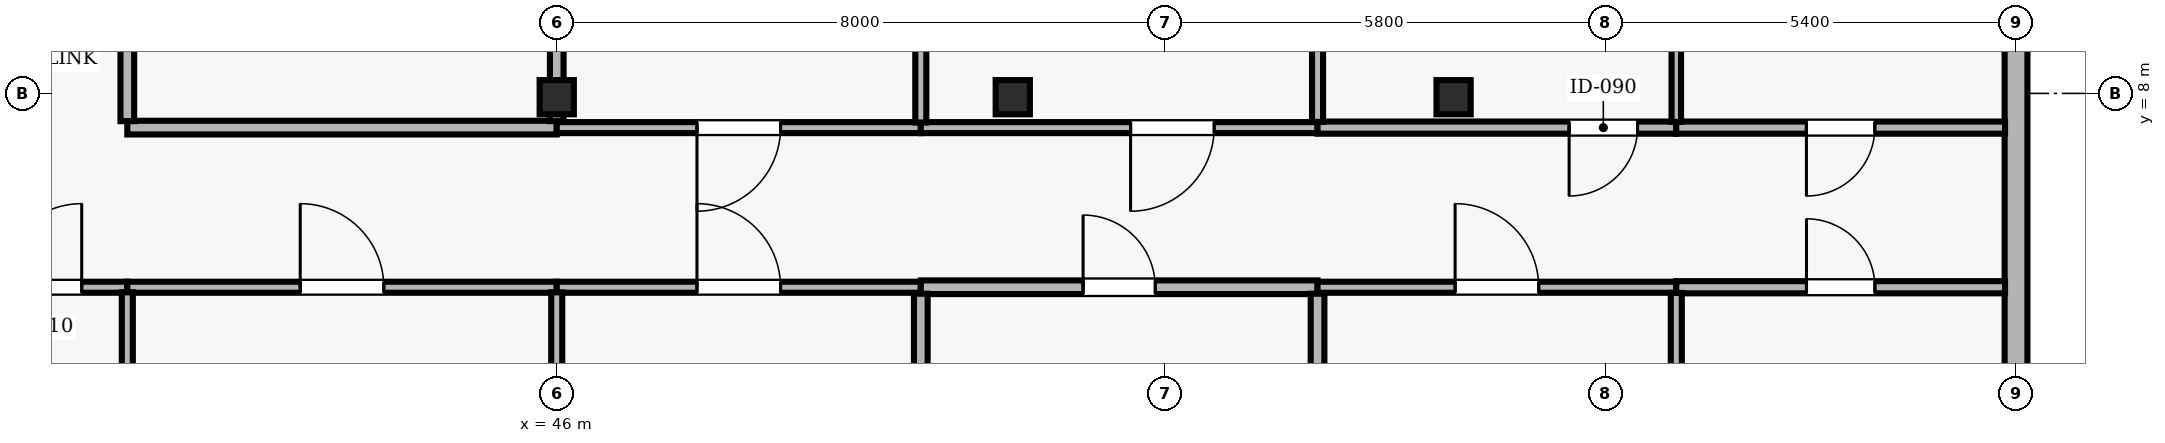
"""IFC4 building model, lengths in metres.
Left out: names, types, materials, properties, quantities, classifications, styles, units other than length and angle.
Written with IfcOpenShell. Run it as: python <this file> out.ifc"""

import sys

from ifc_helpers import new_model, si_unit, direction, frame, frame_2d, origin, origin_2d, place, context, subcontext, project, spatial, rectangle, hollow_rectangle, extrude, element, fill, save


model = new_model("IFC4")
c1 = context("Model", 3, precision=1e-05, world=origin(), true_north=direction((0.0, 1.0)))
c2 = subcontext(c1, "Body", "Model", "MODEL_VIEW")
j1 = project(units=[si_unit("LENGTHUNIT", "METRE"), si_unit("PLANEANGLEUNIT", "RADIAN")], contexts=[c1])
p1 = place(None, origin())
s1 = spatial("IfcSite", under=j1, at=p1, CompositionType="ELEMENT")
p2 = place(p1, origin())
s2 = spatial("IfcBuilding", under=s1, at=p2, CompositionType="ELEMENT")
p3 = place(p2, frame((0.0, 0.0, 207.0)))
s3 = spatial("IfcBuildingStorey", under=s2, at=p3, CompositionType="ELEMENT", Elevation=207.0)
for number, where, z_axis, x_axis in (
    (1, (46.0, 7.95, 0.0), (0.0, 0.0, 1.0), (1.0, 0.0, 0.0)),
    (2, (52.0, 7.95, 0.0), (0.0, 0.0, 1.0), (1.0, 0.0, 0.0)),
    (3, (57.8, 7.95, 0.0), (0.0, 0.0, 1.0), (1.0, 0.0, 0.0)),
):
    element("IfcColumn", number, at=place(p3, frame(where, z_axis=z_axis, x_axis=x_axis)), inside=s3, PredefinedType="COLUMN", context=c2, shape_type="SweptSolid", body=[
        extrude(hollow_rectangle(XDim=0.45, YDim=0.45, WallThickness=0.02, at=origin_2d()), origin(), (0.0, 0.0, 1.0), 3.9),
    ])
p4 = place(p3, frame((65.2, 2.5, 0.0), z_axis=(0.0, 0.0, 1.0), x_axis=(0.0, 1.0, 0.0)))
e4 = element("IfcWall", 4, at=p4, inside=s3, PredefinedType="SOLIDWALL", context=c2, shape_type="SweptSolid", body=[
    extrude(rectangle(XDim=11.0, YDim=0.3, at=frame_2d((5.5, 0.0))), origin(), (0.0, 0.0, 1.0), 3.69),
])
p5 = place(p4, frame((7.05, 0.0, 0.9)))
e5 = element("IfcOpeningElement", 5, at=p5, cuts=e4, PredefinedType="OPENING", context=c2, shape_type="SweptSolid", body=[
    extrude(rectangle(XDim=2.4, YDim=1.6, at=frame_2d((1.2, 0.8))), frame((0.0, 0.16, 0.0), z_axis=(0.0, -1.0, 0.0), x_axis=(1.0, 0.0, 0.0)), (0.0, 0.0, 1.0), 0.32),
])
p6 = place(p3, frame((38.05, 5.45, 0.0), z_axis=(0.0, 0.0, 1.0), x_axis=(1.0, 0.0, 0.0)))
e6 = element("IfcWall", 6, at=p6, inside=s3, PredefinedType="PARTITIONING", context=c2, shape_type="SweptSolid", body=[
    extrude(rectangle(XDim=2.3, YDim=0.145, at=frame_2d((1.15, 0.0))), origin(), (0.0, 0.0, 1.0), 3.343),
])
p7 = place(p6, frame((0.6, 0.0, 0.0)))
e7 = element("IfcOpeningElement", 7, at=p7, cuts=e6, PredefinedType="OPENING", context=c2, shape_type="SweptSolid", body=[
    extrude(rectangle(XDim=1.1, YDim=2.15, at=frame_2d((0.55, 1.075))), frame((0.0, 0.083, 0.0), z_axis=(0.0, -1.0, 0.0), x_axis=(1.0, 0.0, 0.0)), (0.0, 0.0, 1.0), 0.165),
])
p8 = place(p3, frame((40.35, 5.45, 0.0), z_axis=(0.0, 0.0, 1.0), x_axis=(1.0, 0.0, 0.0)))
e8 = element("IfcWall", 8, at=p8, inside=s3, PredefinedType="PARTITIONING", context=c2, shape_type="SweptSolid", body=[
    extrude(rectangle(XDim=5.65, YDim=0.145, at=frame_2d((2.825, 0.0))), origin(), (0.0, 0.0, 1.0), 3.343),
])
p9 = place(p8, frame((2.275, 0.0, 0.0)))
e9 = element("IfcOpeningElement", 9, at=p9, cuts=e8, PredefinedType="OPENING", context=c2, shape_type="SweptSolid", body=[
    extrude(rectangle(XDim=1.1, YDim=2.15, at=frame_2d((0.55, 1.075))), frame((0.0, 0.083, 0.0), z_axis=(0.0, -1.0, 0.0), x_axis=(1.0, 0.0, 0.0)), (0.0, 0.0, 1.0), 0.165),
])
p10 = place(p3, frame((46.0, 5.45, 0.0), z_axis=(0.0, 0.0, 1.0), x_axis=(1.0, 0.0, 0.0)))
e10 = element("IfcWall", 10, at=p10, inside=s3, PredefinedType="PARTITIONING", context=c2, shape_type="SweptSolid", body=[
    extrude(rectangle(XDim=4.79, YDim=0.145, at=frame_2d((2.395, 0.0))), origin(), (0.0, 0.0, 1.0), 3.343),
])
p11 = place(p10, frame((1.845, 0.0, 0.0)))
e11 = element("IfcOpeningElement", 11, at=p11, cuts=e10, PredefinedType="OPENING", context=c2, shape_type="SweptSolid", body=[
    extrude(rectangle(XDim=1.1, YDim=2.15, at=frame_2d((0.55, 1.075))), frame((0.0, 0.083, 0.0), z_axis=(0.0, -1.0, 0.0), x_axis=(1.0, 0.0, 0.0)), (0.0, 0.0, 1.0), 0.165),
])
p12 = place(p3, frame((46.0, 7.55, 0.0), z_axis=(0.0, 0.0, 1.0), x_axis=(-1.0, 0.0, 0.0)))
e12 = element("IfcWall", 12, at=p12, inside=s3, PredefinedType="PARTITIONING", context=c2, shape_type="SweptSolid", body=[
    extrude(rectangle(XDim=5.65, YDim=0.18, at=frame_2d((2.825, 0.0))), origin(), (0.0, 0.0, 1.0), 3.139),
])
p13 = place(p3, frame((50.79, 5.45, 0.0), z_axis=(0.0, 0.0, 1.0), x_axis=(1.0, 0.0, 0.0)))
e13 = element("IfcWall", 13, at=p13, inside=s3, PredefinedType="PARTITIONING", context=c2, shape_type="SweptSolid", body=[
    extrude(rectangle(XDim=5.22, YDim=0.18, at=frame_2d((2.61, 0.0))), origin(), (0.0, 0.0, 1.0), 3.343),
])
p14 = place(p13, frame((2.135, 0.0, 0.0)))
e14 = element("IfcOpeningElement", 14, at=p14, cuts=e13, PredefinedType="OPENING", context=c2, shape_type="SweptSolid", body=[
    extrude(rectangle(XDim=0.95, YDim=2.1, at=frame_2d((0.475, 1.05))), frame((0.0, 0.1, 0.0), z_axis=(0.0, -1.0, 0.0), x_axis=(1.0, 0.0, 0.0)), (0.0, 0.0, 1.0), 0.2),
])
p15 = place(p3, frame((50.79, 7.55, 0.0), z_axis=(0.0, 0.0, 1.0), x_axis=(-1.0, 0.0, 0.0)))
e15 = element("IfcWall", 15, at=p15, inside=s3, PredefinedType="PARTITIONING", context=c2, shape_type="SweptSolid", body=[
    extrude(rectangle(XDim=4.79, YDim=0.145, at=frame_2d((2.395, 0.0))), origin(), (0.0, 0.0, 1.0), 3.139),
])
p16 = place(p15, frame((1.845, 0.0, 0.0)))
e16 = element("IfcOpeningElement", 16, at=p16, cuts=e15, PredefinedType="OPENING", context=c2, shape_type="SweptSolid", body=[
    extrude(rectangle(XDim=1.1, YDim=2.15, at=frame_2d((0.55, 1.075))), frame((0.0, 0.083, 0.0), z_axis=(0.0, -1.0, 0.0), x_axis=(1.0, 0.0, 0.0)), (0.0, 0.0, 1.0), 0.165),
])
p17 = place(p3, frame((56.01, 5.45, 0.0), z_axis=(0.0, 0.0, 1.0), x_axis=(1.0, 0.0, 0.0)))
e17 = element("IfcWall", 17, at=p17, inside=s3, PredefinedType="PARTITIONING", context=c2, shape_type="SweptSolid", body=[
    extrude(rectangle(XDim=4.72, YDim=0.145, at=frame_2d((2.36, 0.0))), origin(), (0.0, 0.0, 1.0), 3.343),
])
p18 = place(p17, frame((1.81, 0.0, 0.0)))
e18 = element("IfcOpeningElement", 18, at=p18, cuts=e17, PredefinedType="OPENING", context=c2, shape_type="SweptSolid", body=[
    extrude(rectangle(XDim=1.1, YDim=2.15, at=frame_2d((0.55, 1.075))), frame((0.0, 0.083, 0.0), z_axis=(0.0, -1.0, 0.0), x_axis=(1.0, 0.0, 0.0)), (0.0, 0.0, 1.0), 0.165),
])
p19 = place(p3, frame((56.01, 7.55, 0.0), z_axis=(0.0, 0.0, 1.0), x_axis=(-1.0, 0.0, 0.0)))
e19 = element("IfcWall", 19, at=p19, inside=s3, PredefinedType="PARTITIONING", context=c2, shape_type="SweptSolid", body=[
    extrude(rectangle(XDim=5.22, YDim=0.145, at=frame_2d((2.61, 0.0))), origin(), (0.0, 0.0, 1.0), 3.139),
])
p20 = place(p19, frame((1.36, 0.0, 0.0)))
e20 = element("IfcOpeningElement", 20, at=p20, cuts=e19, PredefinedType="OPENING", context=c2, shape_type="SweptSolid", body=[
    extrude(rectangle(XDim=1.1, YDim=2.15, at=frame_2d((0.55, 1.075))), frame((0.0, 0.083, 0.0), z_axis=(0.0, -1.0, 0.0), x_axis=(1.0, 0.0, 0.0)), (0.0, 0.0, 1.0), 0.165),
])
p21 = place(p3, frame((60.73, 5.45, 0.0), z_axis=(0.0, 0.0, 1.0), x_axis=(1.0, 0.0, 0.0)))
e21 = element("IfcWall", 21, at=p21, inside=s3, PredefinedType="PARTITIONING", context=c2, shape_type="SweptSolid", body=[
    extrude(rectangle(XDim=4.325, YDim=0.16, at=frame_2d((2.163, 0.0))), origin(), (0.0, 0.0, 1.0), 3.69),
])
p22 = place(p21, frame((1.713, 0.0, 0.0)))
e22 = element("IfcOpeningElement", 22, at=p22, cuts=e21, PredefinedType="OPENING", context=c2, shape_type="SweptSolid", body=[
    extrude(rectangle(XDim=0.9, YDim=2.1, at=frame_2d((0.45, 1.05))), frame((0.0, 0.09, 0.0), z_axis=(0.0, -1.0, 0.0), x_axis=(1.0, 0.0, 0.0)), (0.0, 0.0, 1.0), 0.18),
])
p23 = place(p3, frame((60.73, 7.55, 0.0), z_axis=(0.0, 0.0, 1.0), x_axis=(-1.0, 0.0, 0.0)))
e23 = element("IfcWall", 23, at=p23, inside=s3, PredefinedType="PARTITIONING", context=c2, shape_type="SweptSolid", body=[
    extrude(rectangle(XDim=4.72, YDim=0.16, at=frame_2d((2.36, 0.0))), origin(), (0.0, 0.0, 1.0), 3.139),
])
p24 = place(p23, frame((0.51, 0.0, 0.0)))
e24 = element("IfcOpeningElement", 24, at=p24, cuts=e23, PredefinedType="OPENING", context=c2, shape_type="SweptSolid", body=[
    extrude(rectangle(XDim=0.9, YDim=2.1, at=frame_2d((0.45, 1.05))), frame((0.0, 0.09, 0.0), z_axis=(0.0, -1.0, 0.0), x_axis=(1.0, 0.0, 0.0)), (0.0, 0.0, 1.0), 0.18),
])
p25 = place(p3, frame((65.055, 7.55, 0.0), z_axis=(0.0, 0.0, 1.0), x_axis=(-1.0, 0.0, 0.0)))
e25 = element("IfcWall", 25, at=p25, inside=s3, PredefinedType="PARTITIONING", context=c2, shape_type="SweptSolid", body=[
    extrude(rectangle(XDim=4.325, YDim=0.16, at=frame_2d((2.163, 0.0))), origin(), (0.0, 0.0, 1.0), 3.69),
])
p26 = place(p25, frame((1.713, 0.0, 0.0)))
e26 = element("IfcOpeningElement", 26, at=p26, cuts=e25, PredefinedType="OPENING", context=c2, shape_type="SweptSolid", body=[
    extrude(rectangle(XDim=0.9, YDim=2.1, at=frame_2d((0.45, 1.05))), frame((0.0, 0.09, 0.0), z_axis=(0.0, -1.0, 0.0), x_axis=(1.0, 0.0, 0.0)), (0.0, 0.0, 1.0), 0.18),
])
p27 = place(p3, frame((40.35, 0.09, 0.0), z_axis=(0.0, 0.0, 1.0), x_axis=(0.0, 1.0, 0.0)))
e27 = element("IfcWall", 27, at=p27, inside=s3, PredefinedType="PARTITIONING", context=c2, shape_type="SweptSolid", body=[
    extrude(rectangle(XDim=5.293, YDim=0.145, at=frame_2d((2.646, 0.0))), origin(), (0.0, 0.0, 1.0), 3.69),
])
p28 = place(p3, frame((40.35, 7.635, 0.0), z_axis=(0.0, 0.0, 1.0), x_axis=(0.0, 1.0, 0.0)))
e28 = element("IfcWall", 28, at=p28, inside=s3, PredefinedType="PARTITIONING", context=c2, shape_type="SweptSolid", body=[
    extrude(rectangle(XDim=8.28, YDim=0.18, at=frame_2d((4.14, 0.0))), origin(), (0.0, 0.0, 1.0), 3.343),
])
p29 = place(p28, frame((3.665, 0.0, 0.0)))
e29 = element("IfcOpeningElement", 29, at=p29, cuts=e28, PredefinedType="OPENING", context=c2, shape_type="SweptSolid", body=[
    extrude(rectangle(XDim=0.95, YDim=2.1, at=frame_2d((0.475, 1.05))), frame((0.0, 0.1, 0.0), z_axis=(0.0, -1.0, 0.0), x_axis=(1.0, 0.0, 0.0)), (0.0, 0.0, 1.0), 0.2),
])
p30 = place(p3, frame((46.0, 0.145, 0.0), z_axis=(0.0, 0.0, 1.0), x_axis=(0.0, 1.0, 0.0)))
e30 = element("IfcWall", 30, at=p30, inside=s3, PredefinedType="PARTITIONING", context=c2, shape_type="SweptSolid", body=[
    extrude(rectangle(XDim=5.238, YDim=0.145, at=frame_2d((2.619, 0.0))), origin(), (0.0, 0.0, 1.0), 3.139),
])
p31 = place(p3, frame((46.0, 7.635, 0.0), z_axis=(0.0, 0.0, 1.0), x_axis=(0.0, 1.0, 0.0)))
e31 = element("IfcWall", 31, at=p31, inside=s3, PredefinedType="PARTITIONING", context=c2, shape_type="SweptSolid", body=[
    extrude(rectangle(XDim=8.22, YDim=0.18, at=frame_2d((4.11, 0.0))), origin(), (0.0, 0.0, 1.0), 3.139),
])
p32 = place(p3, frame((50.79, 0.09, 0.0), z_axis=(0.0, 0.0, 1.0), x_axis=(0.0, 1.0, 0.0)))
e32 = element("IfcWall", 32, at=p32, inside=s3, PredefinedType="PARTITIONING", context=c2, shape_type="SweptSolid", body=[
    extrude(rectangle(XDim=5.275, YDim=0.18, at=frame_2d((2.637, 0.0))), origin(), (0.0, 0.0, 1.0), 3.69),
])
p33 = place(p3, frame((50.79, 7.617, 0.0), z_axis=(0.0, 0.0, 1.0), x_axis=(0.0, 1.0, 0.0)))
e33 = element("IfcWall", 33, at=p33, inside=s3, PredefinedType="PARTITIONING", context=c2, shape_type="SweptSolid", body=[
    extrude(rectangle(XDim=8.238, YDim=0.145, at=frame_2d((4.119, 0.0))), origin(), (0.0, 0.0, 1.0), 3.69),
])
p34 = place(p3, frame((56.01, 0.09, 0.0), z_axis=(0.0, 0.0, 1.0), x_axis=(0.0, 1.0, 0.0)))
e34 = element("IfcWall", 34, at=p34, inside=s3, PredefinedType="PARTITIONING", context=c2, shape_type="SweptSolid", body=[
    extrude(rectangle(XDim=5.275, YDim=0.18, at=frame_2d((2.637, 0.0))), origin(), (0.0, 0.0, 1.0), 3.69),
])
p35 = place(p3, frame((56.01, 7.625, 0.0), z_axis=(0.0, 0.0, 1.0), x_axis=(0.0, 1.0, 0.0)))
e35 = element("IfcWall", 35, at=p35, inside=s3, PredefinedType="PARTITIONING", context=c2, shape_type="SweptSolid", body=[
    extrude(rectangle(XDim=8.23, YDim=0.145, at=frame_2d((4.115, 0.0))), origin(), (0.0, 0.0, 1.0), 3.69),
])
p36 = place(p3, frame((60.73, 0.09, 0.0), z_axis=(0.0, 0.0, 1.0), x_axis=(0.0, 1.0, 0.0)))
e36 = element("IfcWall", 36, at=p36, inside=s3, PredefinedType="PARTITIONING", context=c2, shape_type="SweptSolid", body=[
    extrude(rectangle(XDim=5.285, YDim=0.145, at=frame_2d((2.643, 0.0))), origin(), (0.0, 0.0, 1.0), 3.69),
])
p37 = place(p3, frame((60.73, 7.625, 0.0), z_axis=(0.0, 0.0, 1.0), x_axis=(0.0, 1.0, 0.0)))
e37 = element("IfcWall", 37, at=p37, inside=s3, PredefinedType="PARTITIONING", context=c2, shape_type="SweptSolid", body=[
    extrude(rectangle(XDim=8.23, YDim=0.125, at=frame_2d((4.115, 0.0))), origin(), (0.0, 0.0, 1.0), 3.69),
])
p38 = place(p7, origin())
e38 = element("IfcDoor", 38, at=p38, inside=s3, OperationType="SINGLE_SWING_RIGHT", PredefinedType="DOOR", context=c2, shape_type="SweptSolid", body=[
    extrude(rectangle(XDim=1.1, YDim=2.15, at=frame_2d((0.55, 1.075))), frame((0.0, 0.025, 0.0), z_axis=(0.0, -1.0, 0.0), x_axis=(1.0, 0.0, 0.0)), (0.0, 0.0, 1.0), 0.05),
])
fill(e7, e38)
p39 = place(p9, origin())
e39 = element("IfcDoor", 39, at=p39, inside=s3, OperationType="SINGLE_SWING_LEFT", PredefinedType="DOOR", context=c2, shape_type="SweptSolid", body=[
    extrude(rectangle(XDim=1.1, YDim=2.15, at=frame_2d((0.55, 1.075))), frame((0.0, 0.025, 0.0), z_axis=(0.0, -1.0, 0.0), x_axis=(1.0, 0.0, 0.0)), (0.0, 0.0, 1.0), 0.05),
])
fill(e9, e39)
p40 = place(p11, origin())
e40 = element("IfcDoor", 40, at=p40, inside=s3, OperationType="SINGLE_SWING_LEFT", PredefinedType="DOOR", context=c2, shape_type="SweptSolid", body=[
    extrude(rectangle(XDim=1.1, YDim=2.15, at=frame_2d((0.55, 1.075))), frame((0.0, 0.025, 0.0), z_axis=(0.0, -1.0, 0.0), x_axis=(1.0, 0.0, 0.0)), (0.0, 0.0, 1.0), 0.05),
])
fill(e11, e40)
p41 = place(p16, origin())
e41 = element("IfcDoor", 41, at=p41, inside=s3, OperationType="SINGLE_SWING_RIGHT", PredefinedType="DOOR", context=c2, shape_type="SweptSolid", body=[
    extrude(rectangle(XDim=1.1, YDim=2.15, at=frame_2d((0.55, 1.075))), frame((0.0, 0.025, 0.0), z_axis=(0.0, -1.0, 0.0), x_axis=(1.0, 0.0, 0.0)), (0.0, 0.0, 1.0), 0.05),
])
fill(e16, e41)
p42 = place(p14, origin())
e42 = element("IfcDoor", 42, at=p42, inside=s3, OperationType="SINGLE_SWING_LEFT", PredefinedType="DOOR", context=c2, shape_type="SweptSolid", body=[
    extrude(rectangle(XDim=0.95, YDim=2.1, at=frame_2d((0.475, 1.05))), frame((0.0, 0.025, 0.0), z_axis=(0.0, -1.0, 0.0), x_axis=(1.0, 0.0, 0.0)), (0.0, 0.0, 1.0), 0.05),
])
fill(e14, e42)
p43 = place(p20, origin())
e43 = element("IfcDoor", 43, at=p43, inside=s3, OperationType="SINGLE_SWING_RIGHT", PredefinedType="DOOR", context=c2, shape_type="SweptSolid", body=[
    extrude(rectangle(XDim=1.1, YDim=2.15, at=frame_2d((0.55, 1.075))), frame((0.0, 0.025, 0.0), z_axis=(0.0, -1.0, 0.0), x_axis=(1.0, 0.0, 0.0)), (0.0, 0.0, 1.0), 0.05),
])
fill(e20, e43)
p44 = place(p18, origin())
e44 = element("IfcDoor", 44, at=p44, inside=s3, OperationType="SINGLE_SWING_LEFT", PredefinedType="DOOR", context=c2, shape_type="SweptSolid", body=[
    extrude(rectangle(XDim=1.1, YDim=2.15, at=frame_2d((0.55, 1.075))), frame((0.0, 0.025, 0.0), z_axis=(0.0, -1.0, 0.0), x_axis=(1.0, 0.0, 0.0)), (0.0, 0.0, 1.0), 0.05),
])
fill(e18, e44)
p45 = place(p24, origin())
e45 = element("IfcDoor", 45, at=p45, inside=s3, OperationType="SINGLE_SWING_RIGHT", PredefinedType="DOOR", context=c2, shape_type="SweptSolid", body=[
    extrude(rectangle(XDim=0.9, YDim=2.1, at=frame_2d((0.45, 1.05))), frame((0.0, 0.025, 0.0), z_axis=(0.0, -1.0, 0.0), x_axis=(1.0, 0.0, 0.0)), (0.0, 0.0, 1.0), 0.05),
])
fill(e24, e45)
p46 = place(p22, origin())
e46 = element("IfcDoor", 46, at=p46, inside=s3, OperationType="SINGLE_SWING_LEFT", PredefinedType="DOOR", context=c2, shape_type="SweptSolid", body=[
    extrude(rectangle(XDim=0.9, YDim=2.1, at=frame_2d((0.45, 1.05))), frame((0.0, 0.025, 0.0), z_axis=(0.0, -1.0, 0.0), x_axis=(1.0, 0.0, 0.0)), (0.0, 0.0, 1.0), 0.05),
])
fill(e22, e46)
p47 = place(p26, origin())
e47 = element("IfcDoor", 47, at=p47, inside=s3, OperationType="SINGLE_SWING_RIGHT", PredefinedType="DOOR", context=c2, shape_type="SweptSolid", body=[
    extrude(rectangle(XDim=0.9, YDim=2.1, at=frame_2d((0.45, 1.05))), frame((0.0, 0.025, 0.0), z_axis=(0.0, -1.0, 0.0), x_axis=(1.0, 0.0, 0.0)), (0.0, 0.0, 1.0), 0.05),
])
fill(e26, e47)
save(model, sys.argv[1])
